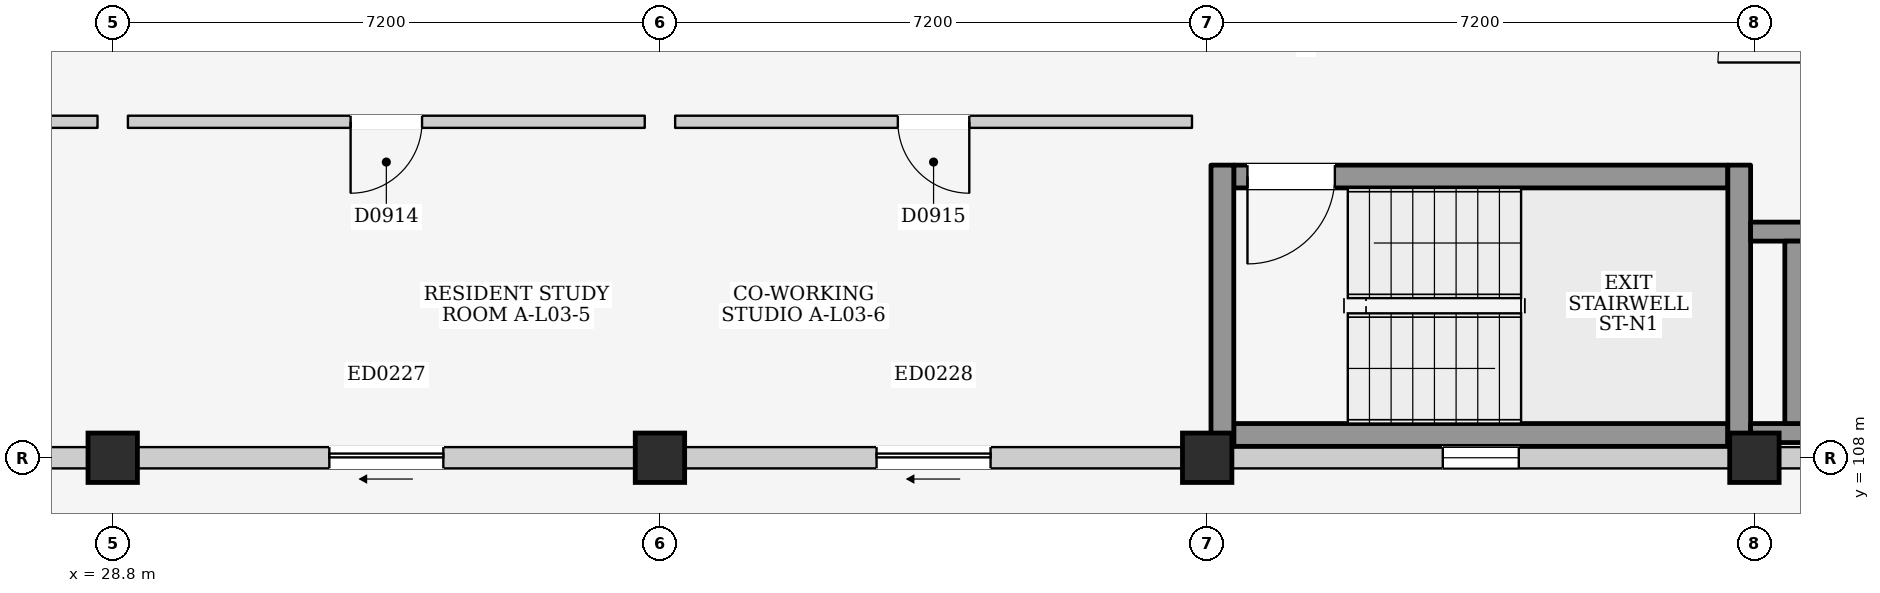
"""IFC4 building model, lengths in metres.
Left out: names, types, materials, properties, quantities, classifications, styles, units other than length and angle.
Written with IfcOpenShell. Run it as: python <this file> out.ifc"""

import sys

from ifc_helpers import new_model, si_unit, direction, frame, frame_2d, origin, origin_2d, place, context, subcontext, project, spatial, rectangle, extrude, element, fill, save


model = new_model("IFC4")
c1 = context("Model", 3, precision=1e-05, world=origin(), true_north=direction((0.0, 1.0)))
c2 = subcontext(c1, "Body", "Model", "MODEL_VIEW")
j1 = project(units=[si_unit("LENGTHUNIT", "METRE"), si_unit("PLANEANGLEUNIT", "RADIAN")], contexts=[c1])
p1 = place(None, origin())
s1 = spatial("IfcSite", under=j1, at=p1, CompositionType="ELEMENT")
p2 = place(p1, origin())
s2 = spatial("IfcBuilding", under=s1, at=p2, CompositionType="ELEMENT")
p3 = place(p2, frame((0.0, 0.0, 12.2)))
s3 = spatial("IfcBuildingStorey", under=s2, at=p3, CompositionType="ELEMENT", Elevation=12.2)
for number, where, z_axis, x_axis in (
    (1, (28.8, 108.0, 0.0), (0.0, 0.0, 1.0), (1.0, 0.0, 0.0)),
    (2, (36.0, 108.0, 0.0), (0.0, 0.0, 1.0), (1.0, 0.0, 0.0)),
    (3, (43.2, 108.0, 0.0), (0.0, 0.0, 1.0), (1.0, 0.0, 0.0)),
    (4, (50.4, 108.0, 0.0), (0.0, 0.0, 1.0), (1.0, 0.0, 0.0)),
):
    element("IfcColumn", number, at=place(p3, frame(where, z_axis=z_axis, x_axis=x_axis)), inside=s3, PredefinedType="COLUMN", context=c2, shape_type="SweptSolid", body=[
        extrude(rectangle(XDim=0.65, YDim=0.65, at=origin_2d()), origin(), (0.0, 0.0, 1.0), 3.2),
    ])
p4 = place(p3, frame((21.925, 108.0, 0.0), z_axis=(0.0, 0.0, 1.0), x_axis=(1.0, 0.0, 0.0)))
e5 = element("IfcWall", 5, at=p4, inside=s3, PredefinedType="ELEMENTEDWALL", context=c2, shape_type="SweptSolid", body=[
    extrude(rectangle(XDim=6.55, YDim=0.28, at=frame_2d((3.275, 0.0))), origin(), (0.0, 0.0, 1.0), 2.315),
])
p5 = place(p4, frame((2.525, 0.0, 0.0)))
e6 = element("IfcOpeningElement", 6, at=p5, cuts=e5, PredefinedType="OPENING", context=c2, shape_type="SweptSolid", body=[
    extrude(rectangle(XDim=1.5, YDim=2.12, at=frame_2d((0.75, 1.06))), frame((0.0, 0.155, 0.0), z_axis=(0.0, -1.0, 0.0), x_axis=(1.0, 0.0, 0.0)), (0.0, 0.0, 1.0), 0.31),
])
p6 = place(p3, frame((29.125, 108.0, 0.0), z_axis=(0.0, 0.0, 1.0), x_axis=(1.0, 0.0, 0.0)))
e7 = element("IfcWall", 7, at=p6, inside=s3, PredefinedType="ELEMENTEDWALL", context=c2, shape_type="SweptSolid", body=[
    extrude(rectangle(XDim=6.55, YDim=0.28, at=frame_2d((3.275, 0.0))), origin(), (0.0, 0.0, 1.0), 2.315),
])
p7 = place(p6, frame((2.525, 0.0, 0.0)))
e8 = element("IfcOpeningElement", 8, at=p7, cuts=e7, PredefinedType="OPENING", context=c2, shape_type="SweptSolid", body=[
    extrude(rectangle(XDim=1.5, YDim=2.12, at=frame_2d((0.75, 1.06))), frame((0.0, 0.155, 0.0), z_axis=(0.0, -1.0, 0.0), x_axis=(1.0, 0.0, 0.0)), (0.0, 0.0, 1.0), 0.31),
])
p8 = place(p3, frame((36.325, 108.0, 0.0), z_axis=(0.0, 0.0, 1.0), x_axis=(1.0, 0.0, 0.0)))
e9 = element("IfcWall", 9, at=p8, inside=s3, PredefinedType="ELEMENTEDWALL", context=c2, shape_type="SweptSolid", body=[
    extrude(rectangle(XDim=6.55, YDim=0.28, at=frame_2d((3.275, 0.0))), origin(), (0.0, 0.0, 1.0), 2.315),
])
p9 = place(p8, frame((2.525, 0.0, 0.0)))
e10 = element("IfcOpeningElement", 10, at=p9, cuts=e9, PredefinedType="OPENING", context=c2, shape_type="SweptSolid", body=[
    extrude(rectangle(XDim=1.5, YDim=2.12, at=frame_2d((0.75, 1.06))), frame((0.0, 0.155, 0.0), z_axis=(0.0, -1.0, 0.0), x_axis=(1.0, 0.0, 0.0)), (0.0, 0.0, 1.0), 0.31),
])
p10 = place(p3, frame((43.525, 108.0, 0.0), z_axis=(0.0, 0.0, 1.0), x_axis=(1.0, 0.0, 0.0)))
e11 = element("IfcWall", 11, at=p10, inside=s3, PredefinedType="ELEMENTEDWALL", context=c2, shape_type="SweptSolid", body=[
    extrude(rectangle(XDim=6.55, YDim=0.28, at=frame_2d((3.275, 0.0))), origin(), (0.0, 0.0, 1.0), 2.315),
])
p11 = place(p10, frame((2.775, 0.0, 1.2)))
e12 = element("IfcOpeningElement", 12, at=p11, cuts=e11, PredefinedType="OPENING", context=c2, shape_type="SweptSolid", body=[
    extrude(rectangle(XDim=1.0, YDim=0.9, at=frame_2d((0.5, 0.45))), frame((0.0, 0.155, 0.0), z_axis=(0.0, -1.0, 0.0), x_axis=(1.0, 0.0, 0.0)), (0.0, 0.0, 1.0), 0.31),
])
p12 = place(p3, frame((50.725, 108.0, 0.0), z_axis=(0.0, 0.0, 1.0), x_axis=(1.0, 0.0, 0.0)))
e13 = element("IfcWall", 13, at=p12, inside=s3, PredefinedType="ELEMENTEDWALL", context=c2, shape_type="SweptSolid", body=[
    extrude(rectangle(XDim=6.55, YDim=0.28, at=frame_2d((3.275, 0.0))), origin(), (0.0, 0.0, 1.0), 2.315),
])
p13 = place(p12, frame((2.775, 0.0, 1.2)))
e14 = element("IfcOpeningElement", 14, at=p13, cuts=e13, PredefinedType="OPENING", context=c2, shape_type="SweptSolid", body=[
    extrude(rectangle(XDim=1.0, YDim=0.9, at=frame_2d((0.5, 0.45))), frame((0.0, 0.155, 0.0), z_axis=(0.0, -1.0, 0.0), x_axis=(1.0, 0.0, 0.0)), (0.0, 0.0, 1.0), 0.31),
])
p14 = place(p3, frame((43.55, 108.3, 0.0), z_axis=(0.0, 0.0, 1.0), x_axis=(1.0, 0.0, 0.0)))
e15 = element("IfcWall", 15, at=p14, inside=s3, PredefinedType="SHEAR", context=c2, shape_type="SweptSolid", body=[
    extrude(rectangle(XDim=6.5, YDim=0.3, at=frame_2d((3.25, 0.0))), origin(), (0.0, 0.0, 1.0), 2.98),
])
p15 = place(p3, frame((43.55, 111.7, 0.0), z_axis=(0.0, 0.0, 1.0), x_axis=(1.0, 0.0, 0.0)))
e16 = element("IfcWall", 16, at=p15, inside=s3, PredefinedType="SHEAR", context=c2, shape_type="SweptSolid", body=[
    extrude(rectangle(XDim=6.5, YDim=0.3, at=frame_2d((3.25, 0.0))), origin(), (0.0, 0.0, 1.0), 2.98),
])
p16 = place(p15, frame((0.18, 0.0, 0.0)))
e17 = element("IfcOpeningElement", 17, at=p16, cuts=e16, PredefinedType="OPENING", context=c2, shape_type="SweptSolid", body=[
    extrude(rectangle(XDim=1.15, YDim=2.2, at=frame_2d((0.575, 1.1))), frame((0.0, 0.165, 0.0), z_axis=(0.0, -1.0, 0.0), x_axis=(1.0, 0.0, 0.0)), (0.0, 0.0, 1.0), 0.33),
])
for number, where, z_axis, x_axis in (
    (18, (43.4, 108.15, 0.0), (0.0, 0.0, 1.0), (0.0, 1.0, 0.0)),
    (19, (50.2, 108.15, 0.0), (0.0, 0.0, 1.0), (0.0, 1.0, 0.0)),
):
    element("IfcWall", number, at=place(p3, frame(where, z_axis=z_axis, x_axis=x_axis)), inside=s3, PredefinedType="SHEAR", context=c2, shape_type="SweptSolid", body=[
        extrude(rectangle(XDim=3.7, YDim=0.3, at=frame_2d((1.85, 0.0))), origin(), (0.0, 0.0, 1.0), 2.98),
    ])
p17 = place(p3, frame((50.35, 108.325, 0.0), z_axis=(0.0, 0.0, 1.0), x_axis=(1.0, 0.0, 0.0)))
e20 = element("IfcWall", 20, at=p17, inside=s3, PredefinedType="SHEAR", context=c2, shape_type="SweptSolid", body=[
    extrude(rectangle(XDim=2.675, YDim=0.25, at=frame_2d((1.337, 0.0))), origin(), (0.0, 0.0, 1.0), 2.98),
])
p18 = place(p3, frame((50.35, 110.975, 0.0), z_axis=(0.0, 0.0, 1.0), x_axis=(1.0, 0.0, 0.0)))
e21 = element("IfcWall", 21, at=p18, inside=s3, PredefinedType="SHEAR", context=c2, shape_type="SweptSolid", body=[
    extrude(rectangle(XDim=2.675, YDim=0.25, at=frame_2d((1.337, 0.0))), origin(), (0.0, 0.0, 1.0), 2.98),
])
p19 = place(p18, frame((1.0, 0.0, 0.0)))
e22 = element("IfcOpeningElement", 22, at=p19, cuts=e21, PredefinedType="OPENING", context=c2, shape_type="SweptSolid", body=[
    extrude(rectangle(XDim=1.2, YDim=2.25, at=frame_2d((0.6, 1.125))), frame((0.0, 0.14, 0.0), z_axis=(0.0, -1.0, 0.0), x_axis=(1.0, 0.0, 0.0)), (0.0, 0.0, 1.0), 0.28),
])
p20 = place(p3, frame((50.925, 108.45, 0.0), z_axis=(0.0, 0.0, 1.0), x_axis=(0.0, 1.0, 0.0)))
e23 = element("IfcWall", 23, at=p20, inside=s3, PredefinedType="SHEAR", context=c2, shape_type="SweptSolid", body=[
    extrude(rectangle(XDim=2.4, YDim=0.25, at=frame_2d((1.2, 0.0))), origin(), (0.0, 0.0, 1.0), 2.98),
])
p21 = place(p3, frame((21.8, 112.42, 0.0), z_axis=(0.0, 0.0, 1.0), x_axis=(1.0, 0.0, 0.0)))
e24 = element("IfcWall", 24, at=p21, inside=s3, PredefinedType="PARTITIONING", context=c2, shape_type="SweptSolid", body=[
    extrude(rectangle(XDim=6.8, YDim=0.16, at=frame_2d((3.4, 0.0))), origin(), (0.0, 0.0, 1.0), 2.98),
])
p22 = place(p21, frame((2.93, 0.0, 0.0)))
e25 = element("IfcOpeningElement", 25, at=p22, cuts=e24, PredefinedType="OPENING", context=c2, shape_type="SweptSolid", body=[
    extrude(rectangle(XDim=0.94, YDim=2.12, at=frame_2d((0.47, 1.06))), frame((0.0, 0.095, 0.0), z_axis=(0.0, -1.0, 0.0), x_axis=(1.0, 0.0, 0.0)), (0.0, 0.0, 1.0), 0.19),
])
p23 = place(p3, frame((29.0, 112.42, 0.0), z_axis=(0.0, 0.0, 1.0), x_axis=(1.0, 0.0, 0.0)))
e26 = element("IfcWall", 26, at=p23, inside=s3, PredefinedType="PARTITIONING", context=c2, shape_type="SweptSolid", body=[
    extrude(rectangle(XDim=6.8, YDim=0.16, at=frame_2d((3.4, 0.0))), origin(), (0.0, 0.0, 1.0), 2.98),
])
p24 = place(p23, frame((2.93, 0.0, 0.0)))
e27 = element("IfcOpeningElement", 27, at=p24, cuts=e26, PredefinedType="OPENING", context=c2, shape_type="SweptSolid", body=[
    extrude(rectangle(XDim=0.94, YDim=2.12, at=frame_2d((0.47, 1.06))), frame((0.0, 0.095, 0.0), z_axis=(0.0, -1.0, 0.0), x_axis=(1.0, 0.0, 0.0)), (0.0, 0.0, 1.0), 0.19),
])
p25 = place(p3, frame((36.2, 112.42, 0.0), z_axis=(0.0, 0.0, 1.0), x_axis=(1.0, 0.0, 0.0)))
e28 = element("IfcWall", 28, at=p25, inside=s3, PredefinedType="PARTITIONING", context=c2, shape_type="SweptSolid", body=[
    extrude(rectangle(XDim=6.8, YDim=0.16, at=frame_2d((3.4, 0.0))), origin(), (0.0, 0.0, 1.0), 2.98),
])
p26 = place(p25, frame((2.93, 0.0, 0.0)))
e29 = element("IfcOpeningElement", 29, at=p26, cuts=e28, PredefinedType="OPENING", context=c2, shape_type="SweptSolid", body=[
    extrude(rectangle(XDim=0.94, YDim=2.12, at=frame_2d((0.47, 1.06))), frame((0.0, 0.095, 0.0), z_axis=(0.0, -1.0, 0.0), x_axis=(1.0, 0.0, 0.0)), (0.0, 0.0, 1.0), 0.19),
])
p27 = place(p7, frame((1.5, 0.0, 0.0), z_axis=(0.0, 0.0, 1.0), x_axis=(-1.0, 0.0, 0.0)))
e30 = element("IfcDoor", 30, at=p27, inside=s3, OperationType="SLIDING_TO_LEFT", PredefinedType="DOOR", context=c2, shape_type="SweptSolid", body=[
    extrude(rectangle(XDim=1.5, YDim=2.12, at=frame_2d((0.75, 1.06))), frame((0.0, 0.025, 0.0), z_axis=(0.0, -1.0, 0.0), x_axis=(1.0, 0.0, 0.0)), (0.0, 0.0, 1.0), 0.05),
])
fill(e8, e30)
p28 = place(p9, frame((1.5, 0.0, 0.0), z_axis=(0.0, 0.0, 1.0), x_axis=(-1.0, 0.0, 0.0)))
e31 = element("IfcDoor", 31, at=p28, inside=s3, OperationType="SLIDING_TO_LEFT", PredefinedType="DOOR", context=c2, shape_type="SweptSolid", body=[
    extrude(rectangle(XDim=1.5, YDim=2.12, at=frame_2d((0.75, 1.06))), frame((0.0, 0.025, 0.0), z_axis=(0.0, -1.0, 0.0), x_axis=(1.0, 0.0, 0.0)), (0.0, 0.0, 1.0), 0.05),
])
fill(e10, e31)
p29 = place(p11, origin())
e32 = element("IfcWindow", 32, at=p29, inside=s3, PartitioningType="SINGLE_PANEL", PredefinedType="WINDOW", context=c2, shape_type="SweptSolid", body=[
    extrude(rectangle(XDim=1.0, YDim=0.9, at=frame_2d((0.5, 0.45))), frame((0.0, 0.03, 0.0), z_axis=(0.0, -1.0, 0.0), x_axis=(1.0, 0.0, 0.0)), (0.0, 0.0, 1.0), 0.06),
])
fill(e12, e32)
p30 = place(p16, frame((1.15, 0.0, 0.0), z_axis=(0.0, 0.0, 1.0), x_axis=(-1.0, 0.0, 0.0)))
e33 = element("IfcDoor", 33, at=p30, inside=s3, OperationType="SINGLE_SWING_RIGHT", PredefinedType="DOOR", context=c2, shape_type="SweptSolid", body=[
    extrude(rectangle(XDim=1.15, YDim=2.2, at=frame_2d((0.575, 1.1))), frame((0.0, 0.025, 0.0), z_axis=(0.0, -1.0, 0.0), x_axis=(1.0, 0.0, 0.0)), (0.0, 0.0, 1.0), 0.05),
])
fill(e17, e33)
p31 = place(p24, frame((0.94, 0.0, 0.0), z_axis=(0.0, 0.0, 1.0), x_axis=(-1.0, 0.0, 0.0)))
e34 = element("IfcDoor", 34, at=p31, inside=s3, OperationType="SINGLE_SWING_RIGHT", PredefinedType="DOOR", context=c2, shape_type="SweptSolid", body=[
    extrude(rectangle(XDim=0.94, YDim=2.12, at=frame_2d((0.47, 1.06))), frame((0.0, 0.025, 0.0), z_axis=(0.0, -1.0, 0.0), x_axis=(1.0, 0.0, 0.0)), (0.0, 0.0, 1.0), 0.05),
])
fill(e27, e34)
p32 = place(p26, frame((0.94, 0.0, 0.0), z_axis=(0.0, 0.0, 1.0), x_axis=(-1.0, 0.0, 0.0)))
e35 = element("IfcDoor", 35, at=p32, inside=s3, OperationType="SINGLE_SWING_LEFT", PredefinedType="DOOR", context=c2, shape_type="SweptSolid", body=[
    extrude(rectangle(XDim=0.94, YDim=2.12, at=frame_2d((0.47, 1.06))), frame((0.0, 0.025, 0.0), z_axis=(0.0, -1.0, 0.0), x_axis=(1.0, 0.0, 0.0)), (0.0, 0.0, 1.0), 0.05),
])
fill(e29, e35)
save(model, sys.argv[1])
